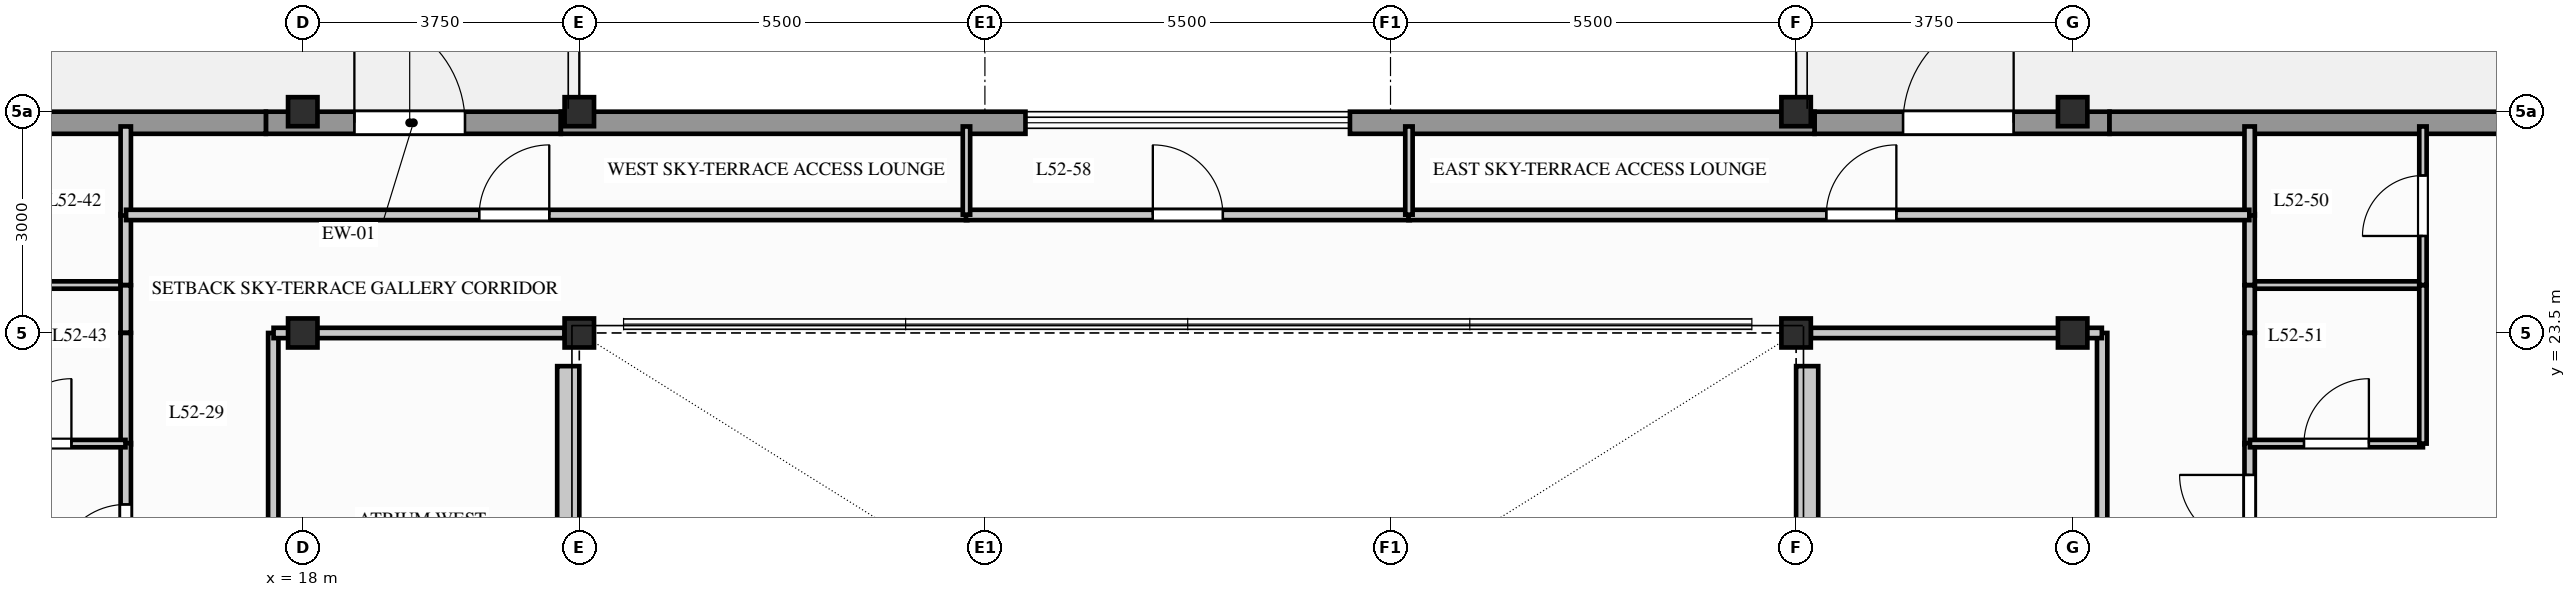
"""IFC4 building model, lengths in metres.
Left out: names, types, materials, properties, quantities, classifications, styles, units other than length and angle.
Written with IfcOpenShell. Run it as: python <this file> out.ifc"""

import sys

from ifc_helpers import new_model, si_unit, direction, frame, frame_2d, origin, origin_2d, place, context, subcontext, project, spatial, rectangle, i_section, extrude, element, fill, save


model = new_model("IFC4")
c1 = context("Model", 3, precision=1e-05, world=origin(), true_north=direction((0.0, 1.0)))
c2 = subcontext(c1, "Body", "Model", "MODEL_VIEW")
j1 = project(units=[si_unit("LENGTHUNIT", "METRE"), si_unit("PLANEANGLEUNIT", "RADIAN")], contexts=[c1])
p1 = place(None, origin())
s1 = spatial("IfcSite", under=j1, at=p1, CompositionType="ELEMENT")
p2 = place(p1, origin())
s2 = spatial("IfcBuilding", under=s1, at=p2, CompositionType="ELEMENT")
p3 = place(p2, frame((0.0, 0.0, 172.8)))
s3 = spatial("IfcBuildingStorey", under=s2, at=p3, CompositionType="ELEMENT", Elevation=172.8)
for number, where, z_axis, x_axis in (
    (1, (18.0, 23.5, 0.0), (0.0, 0.0, 1.0), (1.0, 0.0, 0.0)),
    (2, (18.0, 26.5, 0.0), (0.0, 0.0, 1.0), (1.0, 0.0, 0.0)),
    (3, (21.75, 23.5, 0.0), (0.0, 0.0, 1.0), (1.0, 0.0, 0.0)),
    (4, (21.75, 26.5, 0.0), (0.0, 0.0, 1.0), (1.0, 0.0, 0.0)),
    (5, (38.25, 23.5, 0.0), (0.0, 0.0, 1.0), (1.0, 0.0, 0.0)),
    (6, (38.25, 26.5, 0.0), (0.0, 0.0, 1.0), (1.0, 0.0, 0.0)),
    (7, (42.0, 23.5, 0.0), (0.0, 0.0, 1.0), (1.0, 0.0, 0.0)),
    (8, (42.0, 26.5, 0.0), (0.0, 0.0, 1.0), (1.0, 0.0, 0.0)),
):
    element("IfcColumn", number, at=place(p3, frame(where, z_axis=z_axis, x_axis=x_axis)), inside=s3, PredefinedType="COLUMN", context=c2, shape_type="SweptSolid", body=[
        extrude(i_section(OverallWidth=0.399, OverallDepth=0.394, WebThickness=0.023, FlangeThickness=0.037, FilletRadius=0.015, at=origin_2d()), origin(), (0.0, 0.0, 1.0), 3.1),
    ])
p4 = place(p3, frame((17.5, 26.35, 0.0), z_axis=(0.0, 0.0, 1.0), x_axis=(1.0, 0.0, 0.0)))
e9 = element("IfcWall", 9, at=p4, inside=s3, PredefinedType="STANDARD", context=c2, shape_type="SweptSolid", body=[
    extrude(rectangle(XDim=4.0, YDim=0.3, at=frame_2d((2.0, 0.0))), origin(), (0.0, 0.0, 1.0), 2.332),
])
p5 = place(p4, frame((1.2, 0.0, 0.0)))
e10 = element("IfcOpeningElement", 10, at=p5, cuts=e9, PredefinedType="OPENING", context=c2, shape_type="SweptSolid", body=[
    extrude(rectangle(XDim=1.5, YDim=2.2, at=frame_2d((0.75, 1.1))), frame((0.0, 0.16, 0.0), z_axis=(0.0, -1.0, 0.0), x_axis=(1.0, 0.0, 0.0)), (0.0, 0.0, 1.0), 0.32),
])
p6 = place(p3, frame((38.5, 26.35, 0.0), z_axis=(0.0, 0.0, 1.0), x_axis=(1.0, 0.0, 0.0)))
e11 = element("IfcWall", 11, at=p6, inside=s3, PredefinedType="STANDARD", context=c2, shape_type="SweptSolid", body=[
    extrude(rectangle(XDim=4.0, YDim=0.3, at=frame_2d((2.0, 0.0))), origin(), (0.0, 0.0, 1.0), 2.332),
])
p7 = place(p6, frame((1.2, 0.0, 0.0)))
e12 = element("IfcOpeningElement", 12, at=p7, cuts=e11, PredefinedType="OPENING", context=c2, shape_type="SweptSolid", body=[
    extrude(rectangle(XDim=1.5, YDim=2.2, at=frame_2d((0.75, 1.1))), frame((0.0, 0.16, 0.0), z_axis=(0.0, -1.0, 0.0), x_axis=(1.0, 0.0, 0.0)), (0.0, 0.0, 1.0), 0.32),
])
p8 = place(p3, frame((11.45, 26.35, 0.0), z_axis=(0.0, 0.0, 1.0), x_axis=(1.0, 0.0, 0.0)))
e13 = element("IfcWall", 13, at=p8, inside=s3, PredefinedType="STANDARD", context=c2, shape_type="SweptSolid", body=[
    extrude(rectangle(XDim=6.05, YDim=0.3, at=frame_2d((3.025, 0.0))), origin(), (0.0, 0.0, 1.0), 2.332),
])
for number, where, z_axis, x_axis in (
    (14, (21.5, 26.35, 0.0), (0.0, 0.0, 1.0), (1.0, 0.0, 0.0)),
    (15, (32.2, 26.35, 0.0), (0.0, 0.0, 1.0), (1.0, 0.0, 0.0)),
):
    element("IfcWall", number, at=place(p3, frame(where, z_axis=z_axis, x_axis=x_axis)), inside=s3, PredefinedType="STANDARD", context=c2, shape_type="SweptSolid", body=[
        extrude(rectangle(XDim=6.3, YDim=0.3, at=frame_2d((3.15, 0.0))), origin(), (0.0, 0.0, 1.0), 2.332),
    ])
p9 = place(p3, frame((42.5, 26.35, 0.0), z_axis=(0.0, 0.0, 1.0), x_axis=(1.0, 0.0, 0.0)))
e16 = element("IfcWall", 16, at=p9, inside=s3, PredefinedType="STANDARD", context=c2, shape_type="SweptSolid", body=[
    extrude(rectangle(XDim=6.05, YDim=0.3, at=frame_2d((3.025, 0.0))), origin(), (0.0, 0.0, 1.0), 2.332),
])
p10 = place(p3, frame((21.6, 23.05, 0.0), z_axis=(0.0, 0.0, 1.0), x_axis=(0.0, -1.0, 0.0)))
e17 = element("IfcWall", 17, at=p10, inside=s3, PredefinedType="STANDARD", context=c2, shape_type="SweptSolid", body=[
    extrude(rectangle(XDim=9.4, YDim=0.3, at=frame_2d((4.7, 0.0))), origin(), (0.0, 0.0, 1.0), 2.253),
])
p11 = place(p10, frame((3.2, 0.0, 0.433)))
e18 = element("IfcOpeningElement", 18, at=p11, cuts=e17, PredefinedType="OPENING", context=c2, shape_type="SweptSolid", body=[
    extrude(rectangle(XDim=1.2, YDim=1.6, at=frame_2d((0.6, 0.8))), frame((0.0, 0.16, 0.0), z_axis=(0.0, -1.0, 0.0), x_axis=(1.0, 0.0, 0.0)), (0.0, 0.0, 1.0), 0.32),
])
p12 = place(p3, frame((38.4, 13.65, 0.0), z_axis=(0.0, 0.0, 1.0), x_axis=(0.0, 1.0, 0.0)))
e19 = element("IfcWall", 19, at=p12, inside=s3, PredefinedType="STANDARD", context=c2, shape_type="SweptSolid", body=[
    extrude(rectangle(XDim=9.4, YDim=0.3, at=frame_2d((4.7, 0.0))), origin(), (0.0, 0.0, 1.0), 2.253),
])
p13 = place(p12, frame((3.2, 0.0, 0.433)))
e20 = element("IfcOpeningElement", 20, at=p13, cuts=e19, PredefinedType="OPENING", context=c2, shape_type="SweptSolid", body=[
    extrude(rectangle(XDim=1.2, YDim=1.6, at=frame_2d((0.6, 0.8))), frame((0.0, 0.16, 0.0), z_axis=(0.0, -1.0, 0.0), x_axis=(1.0, 0.0, 0.0)), (0.0, 0.0, 1.0), 0.32),
])
p14 = place(p3, frame((15.6, 21.989, 0.0), z_axis=(0.0, 0.0, 1.0), x_axis=(0.0, 1.0, 0.0)))
e21 = element("IfcWall", 21, at=p14, inside=s3, PredefinedType="PARTITIONING", context=c2, shape_type="SweptSolid", body=[
    extrude(rectangle(XDim=1.511, YDim=0.14, at=frame_2d((0.756, 0.0))), origin(), (0.0, 0.0, 1.0), 2.253),
])
p15 = place(p3, frame((15.6, 19.393, 0.0), z_axis=(0.0, 0.0, 1.0), x_axis=(0.0, 1.0, 0.0)))
e22 = element("IfcWall", 22, at=p15, inside=s3, PredefinedType="PARTITIONING", context=c2, shape_type="SweptSolid", body=[
    extrude(rectangle(XDim=2.615, YDim=0.14, at=frame_2d((1.307, 0.0))), origin(), (0.0, 0.0, 1.0), 2.562),
])
p16 = place(p15, frame((0.832, 0.0, 0.0)))
e23 = element("IfcOpeningElement", 23, at=p16, cuts=e22, PredefinedType="OPENING", context=c2, shape_type="SweptSolid", body=[
    extrude(rectangle(XDim=0.95, YDim=2.05, at=frame_2d((0.475, 1.025))), frame((0.0, 0.08, 0.0), z_axis=(0.0, -1.0, 0.0), x_axis=(1.0, 0.0, 0.0)), (0.0, 0.0, 1.0), 0.16),
])
p17 = place(p3, frame((17.6, 12.604, 0.0), z_axis=(0.0, 0.0, 1.0), x_axis=(0.0, 1.0, 0.0)))
e24 = element("IfcWall", 24, at=p17, inside=s3, PredefinedType="PARTITIONING", context=c2, shape_type="SweptSolid", body=[
    extrude(rectangle(XDim=10.896, YDim=0.14, at=frame_2d((5.448, 0.0))), origin(), (0.0, 0.0, 1.0), 2.253),
])
p18 = place(p17, frame((4.973, 0.0, 0.0)))
e25 = element("IfcOpeningElement", 25, at=p18, cuts=e24, PredefinedType="OPENING", context=c2, shape_type="SweptSolid", body=[
    extrude(rectangle(XDim=0.95, YDim=2.05, at=frame_2d((0.475, 1.025))), frame((0.0, 0.08, 0.0), z_axis=(0.0, -1.0, 0.0), x_axis=(1.0, 0.0, 0.0)), (0.0, 0.0, 1.0), 0.16),
])
p19 = place(p3, frame((44.4, 21.989, 0.0), z_axis=(0.0, 0.0, 1.0), x_axis=(0.0, 1.0, 0.0)))
e26 = element("IfcWall", 26, at=p19, inside=s3, PredefinedType="PARTITIONING", context=c2, shape_type="SweptSolid", body=[
    extrude(rectangle(XDim=1.511, YDim=0.14, at=frame_2d((0.756, 0.0))), origin(), (0.0, 0.0, 1.0), 2.253),
])
p20 = place(p3, frame((44.4, 20.193, 0.0), z_axis=(0.0, 0.0, 1.0), x_axis=(0.0, 1.0, 0.0)))
e27 = element("IfcWall", 27, at=p20, inside=s3, PredefinedType="PARTITIONING", context=c2, shape_type="SweptSolid", body=[
    extrude(rectangle(XDim=1.815, YDim=0.14, at=frame_2d((0.907, 0.0))), origin(), (0.0, 0.0, 1.0), 2.89),
])
p21 = place(p20, frame((0.432, 0.0, 0.0)))
e28 = element("IfcOpeningElement", 28, at=p21, cuts=e27, PredefinedType="OPENING", context=c2, shape_type="SweptSolid", body=[
    extrude(rectangle(XDim=0.95, YDim=2.05, at=frame_2d((0.475, 1.025))), frame((0.0, 0.08, 0.0), z_axis=(0.0, -1.0, 0.0), x_axis=(1.0, 0.0, 0.0)), (0.0, 0.0, 1.0), 0.16),
])
p22 = place(p3, frame((42.4, 12.604, 0.0), z_axis=(0.0, 0.0, 1.0), x_axis=(0.0, 1.0, 0.0)))
e29 = element("IfcWall", 29, at=p22, inside=s3, PredefinedType="PARTITIONING", context=c2, shape_type="SweptSolid", body=[
    extrude(rectangle(XDim=10.896, YDim=0.14, at=frame_2d((5.448, 0.0))), origin(), (0.0, 0.0, 1.0), 2.253),
])
p23 = place(p3, frame((13.25, 24.15, 0.0), z_axis=(0.0, 0.0, 1.0), x_axis=(1.0, 0.0, 0.0)))
e30 = element("IfcWall", 30, at=p23, inside=s3, PredefinedType="PARTITIONING", context=c2, shape_type="SweptSolid", body=[
    extrude(rectangle(XDim=2.35, YDim=0.1, at=frame_2d((1.175, 0.0))), origin(), (0.0, 0.0, 1.0), 2.89),
])
p24 = place(p3, frame((15.6, 24.15, 0.0), z_axis=(0.0, 0.0, 1.0), x_axis=(0.0, 1.0, 0.0)))
e31 = element("IfcWall", 31, at=p24, inside=s3, PredefinedType="PARTITIONING", context=c2, shape_type="SweptSolid", body=[
    extrude(rectangle(XDim=0.961, YDim=0.14, at=frame_2d((0.481, 0.0))), origin(), (0.0, 0.0, 1.0), 2.89),
])
p25 = place(p3, frame((15.6, 25.093, 0.0), z_axis=(0.0, 0.0, 1.0), x_axis=(0.0, 1.0, 0.0)))
e32 = element("IfcWall", 32, at=p25, inside=s3, PredefinedType="PARTITIONING", context=c2, shape_type="SweptSolid", body=[
    extrude(rectangle(XDim=1.207, YDim=0.14, at=frame_2d((0.604, 0.0))), origin(), (0.0, 0.0, 1.0), 2.89),
])
p26 = place(p3, frame((13.25, 22.0, 0.0), z_axis=(0.0, 0.0, 1.0), x_axis=(1.0, 0.0, 0.0)))
e33 = element("IfcWall", 33, at=p26, inside=s3, PredefinedType="PARTITIONING", context=c2, shape_type="SweptSolid", body=[
    extrude(rectangle(XDim=2.346, YDim=0.1, at=frame_2d((1.173, 0.0))), origin(), (0.0, 0.0, 1.0), 2.89),
])
p27 = place(p26, frame((0.733, 0.0, 0.0)))
e34 = element("IfcOpeningElement", 34, at=p27, cuts=e33, PredefinedType="OPENING", context=c2, shape_type="SweptSolid", body=[
    extrude(rectangle(XDim=0.88, YDim=2.04, at=frame_2d((0.44, 1.02))), frame((0.0, 0.06, 0.0), z_axis=(0.0, -1.0, 0.0), x_axis=(1.0, 0.0, 0.0)), (0.0, 0.0, 1.0), 0.12),
])
p28 = place(p3, frame((15.6, 23.504, 0.0), z_axis=(0.0, 0.0, 1.0), x_axis=(0.0, 1.0, 0.0)))
e35 = element("IfcWall", 35, at=p28, inside=s3, PredefinedType="PARTITIONING", context=c2, shape_type="SweptSolid", body=[
    extrude(rectangle(XDim=0.642, YDim=0.14, at=frame_2d((0.321, 0.0))), origin(), (0.0, 0.0, 1.0), 2.253),
])
p29 = place(p3, frame((44.4, 24.15, 0.0), z_axis=(0.0, 0.0, 1.0), x_axis=(1.0, 0.0, 0.0)))
e36 = element("IfcWall", 36, at=p29, inside=s3, PredefinedType="PARTITIONING", context=c2, shape_type="SweptSolid", body=[
    extrude(rectangle(XDim=2.35, YDim=0.1, at=frame_2d((1.175, 0.0))), origin(), (0.0, 0.0, 1.0), 2.89),
])
p30 = place(p3, frame((46.75, 24.15, 0.0), z_axis=(0.0, 0.0, 1.0), x_axis=(0.0, 1.0, 0.0)))
e37 = element("IfcWall", 37, at=p30, inside=s3, PredefinedType="PARTITIONING", context=c2, shape_type="SweptSolid", body=[
    extrude(rectangle(XDim=2.15, YDim=0.1, at=frame_2d((1.075, 0.0))), origin(), (0.0, 0.0, 1.0), 2.89),
])
p31 = place(p30, frame((0.665, 0.0, 0.0)))
e38 = element("IfcOpeningElement", 38, at=p31, cuts=e37, PredefinedType="OPENING", context=c2, shape_type="SweptSolid", body=[
    extrude(rectangle(XDim=0.82, YDim=2.02, at=frame_2d((0.41, 1.01))), frame((0.0, 0.06, 0.0), z_axis=(0.0, -1.0, 0.0), x_axis=(1.0, 0.0, 0.0)), (0.0, 0.0, 1.0), 0.12),
])
p32 = place(p3, frame((44.4, 24.15, 0.0), z_axis=(0.0, 0.0, 1.0), x_axis=(0.0, 1.0, 0.0)))
e39 = element("IfcWall", 39, at=p32, inside=s3, PredefinedType="PARTITIONING", context=c2, shape_type="SweptSolid", body=[
    extrude(rectangle(XDim=0.961, YDim=0.14, at=frame_2d((0.481, 0.0))), origin(), (0.0, 0.0, 1.0), 2.89),
])
p33 = place(p3, frame((44.4, 25.093, 0.0), z_axis=(0.0, 0.0, 1.0), x_axis=(0.0, 1.0, 0.0)))
e40 = element("IfcWall", 40, at=p33, inside=s3, PredefinedType="PARTITIONING", context=c2, shape_type="SweptSolid", body=[
    extrude(rectangle(XDim=1.207, YDim=0.14, at=frame_2d((0.604, 0.0))), origin(), (0.0, 0.0, 1.0), 2.89),
])
p34 = place(p3, frame((44.404, 22.0, 0.0), z_axis=(0.0, 0.0, 1.0), x_axis=(1.0, 0.0, 0.0)))
e41 = element("IfcWall", 41, at=p34, inside=s3, PredefinedType="PARTITIONING", context=c2, shape_type="SweptSolid", body=[
    extrude(rectangle(XDim=2.346, YDim=0.1, at=frame_2d((1.173, 0.0))), origin(), (0.0, 0.0, 1.0), 2.89),
])
p35 = place(p34, frame((0.733, 0.0, 0.0)))
e42 = element("IfcOpeningElement", 42, at=p35, cuts=e41, PredefinedType="OPENING", context=c2, shape_type="SweptSolid", body=[
    extrude(rectangle(XDim=0.88, YDim=2.04, at=frame_2d((0.44, 1.02))), frame((0.0, 0.06, 0.0), z_axis=(0.0, -1.0, 0.0), x_axis=(1.0, 0.0, 0.0)), (0.0, 0.0, 1.0), 0.12),
])
p36 = place(p3, frame((46.75, 22.0, 0.0), z_axis=(0.0, 0.0, 1.0), x_axis=(0.0, 1.0, 0.0)))
e43 = element("IfcWall", 43, at=p36, inside=s3, PredefinedType="PARTITIONING", context=c2, shape_type="SweptSolid", body=[
    extrude(rectangle(XDim=2.146, YDim=0.1, at=frame_2d((1.073, 0.0))), origin(), (0.0, 0.0, 1.0), 2.253),
])
p37 = place(p3, frame((44.4, 23.504, 0.0), z_axis=(0.0, 0.0, 1.0), x_axis=(0.0, 1.0, 0.0)))
e44 = element("IfcWall", 44, at=p37, inside=s3, PredefinedType="PARTITIONING", context=c2, shape_type="SweptSolid", body=[
    extrude(rectangle(XDim=0.642, YDim=0.14, at=frame_2d((0.321, 0.0))), origin(), (0.0, 0.0, 1.0), 2.253),
])
for number, where, z_axis, x_axis in (
    (45, (17.604, 23.5, 0.0), (0.0, 0.0, 1.0), (1.0, 0.0, 0.0)),
    (46, (38.45, 23.5, 0.0), (0.0, 0.0, 1.0), (1.0, 0.0, 0.0)),
):
    element("IfcWall", number, at=place(p3, frame(where, z_axis=z_axis, x_axis=x_axis)), inside=s3, PredefinedType="PARTITIONING", context=c2, shape_type="SweptSolid", body=[
        extrude(rectangle(XDim=3.946, YDim=0.14, at=frame_2d((1.973, 0.0))), origin(), (0.0, 0.0, 1.0), 2.253),
    ])
p38 = place(p3, frame((15.604, 25.1, 0.0), z_axis=(0.0, 0.0, 1.0), x_axis=(1.0, 0.0, 0.0)))
e47 = element("IfcWall", 47, at=p38, inside=s3, PredefinedType="PARTITIONING", context=c2, shape_type="SweptSolid", body=[
    extrude(rectangle(XDim=11.407, YDim=0.14, at=frame_2d((5.704, 0.0))), origin(), (0.0, 0.0, 1.0), 2.253),
])
p39 = place(p38, frame((4.789, 0.0, 0.0)))
e48 = element("IfcOpeningElement", 48, at=p39, cuts=e47, PredefinedType="OPENING", context=c2, shape_type="SweptSolid", body=[
    extrude(rectangle(XDim=0.95, YDim=2.05, at=frame_2d((0.475, 1.025))), frame((0.0, 0.08, 0.0), z_axis=(0.0, -1.0, 0.0), x_axis=(1.0, 0.0, 0.0)), (0.0, 0.0, 1.0), 0.16),
])
p40 = place(p3, frame((26.993, 25.1, 0.0), z_axis=(0.0, 0.0, 1.0), x_axis=(1.0, 0.0, 0.0)))
e49 = element("IfcWall", 49, at=p40, inside=s3, PredefinedType="PARTITIONING", context=c2, shape_type="SweptSolid", body=[
    extrude(rectangle(XDim=6.019, YDim=0.14, at=frame_2d((3.009, 0.0))), origin(), (0.0, 0.0, 1.0), 2.89),
])
p41 = place(p40, frame((2.534, 0.0, 0.0)))
e50 = element("IfcOpeningElement", 50, at=p41, cuts=e49, PredefinedType="OPENING", context=c2, shape_type="SweptSolid", body=[
    extrude(rectangle(XDim=0.95, YDim=2.05, at=frame_2d((0.475, 1.025))), frame((0.0, 0.08, 0.0), z_axis=(0.0, -1.0, 0.0), x_axis=(1.0, 0.0, 0.0)), (0.0, 0.0, 1.0), 0.16),
])
p42 = place(p3, frame((32.993, 25.1, 0.0), z_axis=(0.0, 0.0, 1.0), x_axis=(1.0, 0.0, 0.0)))
e51 = element("IfcWall", 51, at=p42, inside=s3, PredefinedType="PARTITIONING", context=c2, shape_type="SweptSolid", body=[
    extrude(rectangle(XDim=11.403, YDim=0.14, at=frame_2d((5.702, 0.0))), origin(), (0.0, 0.0, 1.0), 2.253),
])
p43 = place(p42, frame((5.667, 0.0, 0.0)))
e52 = element("IfcOpeningElement", 52, at=p43, cuts=e51, PredefinedType="OPENING", context=c2, shape_type="SweptSolid", body=[
    extrude(rectangle(XDim=0.95, YDim=2.05, at=frame_2d((0.475, 1.025))), frame((0.0, 0.08, 0.0), z_axis=(0.0, -1.0, 0.0), x_axis=(1.0, 0.0, 0.0)), (0.0, 0.0, 1.0), 0.16),
])
for number, where, z_axis, x_axis in (
    (53, (27.0, 25.104, 0.0), (0.0, 0.0, 1.0), (0.0, 1.0, 0.0)),
    (54, (33.0, 25.104, 0.0), (0.0, 0.0, 1.0), (0.0, 1.0, 0.0)),
):
    element("IfcWall", number, at=place(p3, frame(where, z_axis=z_axis, x_axis=x_axis)), inside=s3, PredefinedType="PARTITIONING", context=c2, shape_type="SweptSolid", body=[
        extrude(rectangle(XDim=1.196, YDim=0.1, at=frame_2d((0.598, 0.0))), origin(), (0.0, 0.0, 1.0), 2.89),
    ])
p44 = place(p5, origin())
e55 = element("IfcDoor", 55, at=p44, inside=s3, OperationType="SINGLE_SWING_LEFT", PredefinedType="DOOR", context=c2, shape_type="SweptSolid", body=[
    extrude(rectangle(XDim=1.5, YDim=2.2, at=frame_2d((0.75, 1.1))), frame((0.0, 0.025, 0.0), z_axis=(0.0, -1.0, 0.0), x_axis=(1.0, 0.0, 0.0)), (0.0, 0.0, 1.0), 0.05),
])
fill(e10, e55)
p45 = place(p7, origin())
e56 = element("IfcDoor", 56, at=p45, inside=s3, OperationType="SINGLE_SWING_RIGHT", PredefinedType="DOOR", context=c2, shape_type="SweptSolid", body=[
    extrude(rectangle(XDim=1.5, YDim=2.2, at=frame_2d((0.75, 1.1))), frame((0.0, 0.025, 0.0), z_axis=(0.0, -1.0, 0.0), x_axis=(1.0, 0.0, 0.0)), (0.0, 0.0, 1.0), 0.05),
])
fill(e12, e56)
p46 = place(p16, origin())
e57 = element("IfcDoor", 57, at=p46, inside=s3, OperationType="SINGLE_SWING_LEFT", PredefinedType="DOOR", context=c2, shape_type="SweptSolid", body=[
    extrude(rectangle(XDim=0.95, YDim=2.05, at=frame_2d((0.475, 1.025))), frame((0.0, 0.025, 0.0), z_axis=(0.0, -1.0, 0.0), x_axis=(1.0, 0.0, 0.0)), (0.0, 0.0, 1.0), 0.05),
])
fill(e23, e57)
p47 = place(p21, origin())
e58 = element("IfcDoor", 58, at=p47, inside=s3, OperationType="SINGLE_SWING_RIGHT", PredefinedType="DOOR", context=c2, shape_type="SweptSolid", body=[
    extrude(rectangle(XDim=0.95, YDim=2.05, at=frame_2d((0.475, 1.025))), frame((0.0, 0.025, 0.0), z_axis=(0.0, -1.0, 0.0), x_axis=(1.0, 0.0, 0.0)), (0.0, 0.0, 1.0), 0.05),
])
fill(e28, e58)
p48 = place(p27, origin())
e59 = element("IfcDoor", 59, at=p48, inside=s3, OperationType="SINGLE_SWING_RIGHT", PredefinedType="DOOR", context=c2, shape_type="SweptSolid", body=[
    extrude(rectangle(XDim=0.88, YDim=2.04, at=frame_2d((0.44, 1.02))), frame((0.0, 0.025, 0.0), z_axis=(0.0, -1.0, 0.0), x_axis=(1.0, 0.0, 0.0)), (0.0, 0.0, 1.0), 0.05),
])
fill(e34, e59)
p49 = place(p31, origin())
e60 = element("IfcDoor", 60, at=p49, inside=s3, OperationType="SINGLE_SWING_LEFT", PredefinedType="DOOR", context=c2, shape_type="SweptSolid", body=[
    extrude(rectangle(XDim=0.82, YDim=2.02, at=frame_2d((0.41, 1.01))), frame((0.0, 0.025, 0.0), z_axis=(0.0, -1.0, 0.0), x_axis=(1.0, 0.0, 0.0)), (0.0, 0.0, 1.0), 0.05),
])
fill(e38, e60)
p50 = place(p35, origin())
e61 = element("IfcDoor", 61, at=p50, inside=s3, OperationType="SINGLE_SWING_RIGHT", PredefinedType="DOOR", context=c2, shape_type="SweptSolid", body=[
    extrude(rectangle(XDim=0.88, YDim=2.04, at=frame_2d((0.44, 1.02))), frame((0.0, 0.025, 0.0), z_axis=(0.0, -1.0, 0.0), x_axis=(1.0, 0.0, 0.0)), (0.0, 0.0, 1.0), 0.05),
])
fill(e42, e61)
p51 = place(p39, origin())
e62 = element("IfcDoor", 62, at=p51, inside=s3, OperationType="SINGLE_SWING_RIGHT", PredefinedType="DOOR", context=c2, shape_type="SweptSolid", body=[
    extrude(rectangle(XDim=0.95, YDim=2.05, at=frame_2d((0.475, 1.025))), frame((0.0, 0.025, 0.0), z_axis=(0.0, -1.0, 0.0), x_axis=(1.0, 0.0, 0.0)), (0.0, 0.0, 1.0), 0.05),
])
fill(e48, e62)
p52 = place(p41, origin())
e63 = element("IfcDoor", 63, at=p52, inside=s3, OperationType="SINGLE_SWING_LEFT", PredefinedType="DOOR", context=c2, shape_type="SweptSolid", body=[
    extrude(rectangle(XDim=0.95, YDim=2.05, at=frame_2d((0.475, 1.025))), frame((0.0, 0.025, 0.0), z_axis=(0.0, -1.0, 0.0), x_axis=(1.0, 0.0, 0.0)), (0.0, 0.0, 1.0), 0.05),
])
fill(e50, e63)
p53 = place(p43, origin())
e64 = element("IfcDoor", 64, at=p53, inside=s3, OperationType="SINGLE_SWING_RIGHT", PredefinedType="DOOR", context=c2, shape_type="SweptSolid", body=[
    extrude(rectangle(XDim=0.95, YDim=2.05, at=frame_2d((0.475, 1.025))), frame((0.0, 0.025, 0.0), z_axis=(0.0, -1.0, 0.0), x_axis=(1.0, 0.0, 0.0)), (0.0, 0.0, 1.0), 0.05),
])
fill(e52, e64)
save(model, sys.argv[1])
